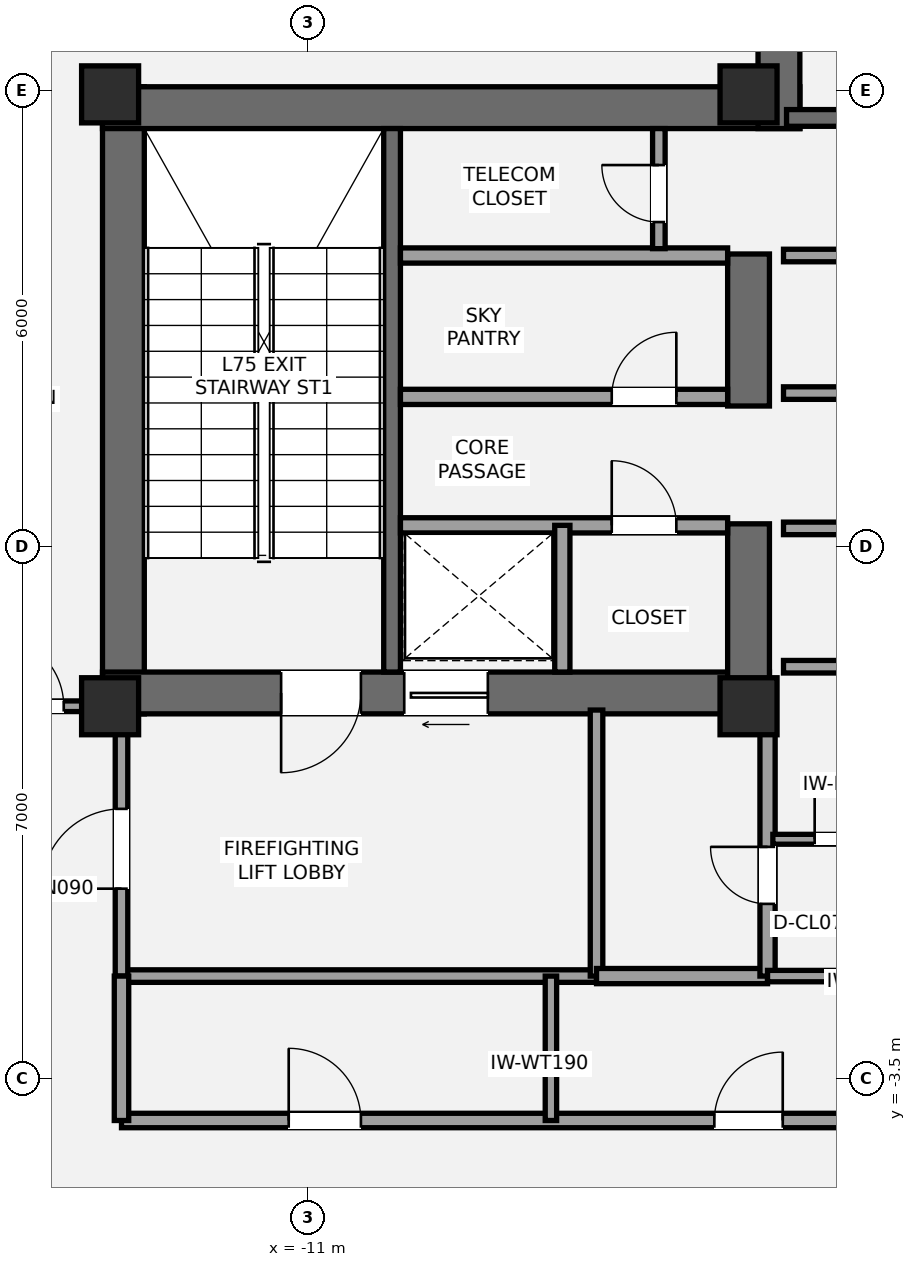
"""IFC4 building model, lengths in metres.
Left out: names, types, materials, properties, quantities, classifications, styles, units other than length and angle.
Written with IfcOpenShell. Run it as: python <this file> out.ifc"""

import sys

from ifc_helpers import new_model, si_unit, direction, frame, frame_2d, origin, origin_2d, place, context, subcontext, project, spatial, rectangle, extrude, element, fill, save


model = new_model("IFC4")
c1 = context("Model", 3, precision=1e-05, world=origin(), true_north=direction((0.0, 1.0)))
c2 = subcontext(c1, "Body", "Model", "MODEL_VIEW")
j1 = project(units=[si_unit("LENGTHUNIT", "METRE"), si_unit("PLANEANGLEUNIT", "RADIAN")], contexts=[c1])
p1 = place(None, origin())
s1 = spatial("IfcSite", under=j1, at=p1, CompositionType="ELEMENT")
p2 = place(p1, origin())
s2 = spatial("IfcBuilding", under=s1, at=p2, CompositionType="ELEMENT")
p3 = place(p2, frame((0.0, 0.0, 264.8)))
s3 = spatial("IfcBuildingStorey", under=s2, at=p3, CompositionType="ELEMENT", Elevation=264.8)
p4 = place(p3, frame((-13.425, 1.3, 0.0), z_axis=(0.0, 0.0, 1.0), x_axis=(0.0, 1.0, 0.0)))
e1 = element("IfcWall", 1, at=p4, inside=s3, PredefinedType="SHEAR", context=c2, shape_type="SweptSolid", body=[
    extrude(rectangle(XDim=8.25, YDim=0.55, at=frame_2d((4.125, 0.0))), origin(), (0.0, 0.0, 1.0), 4.4),
])
p5 = place(p3, frame((-13.7, 9.275, 0.0), z_axis=(0.0, 0.0, 1.0), x_axis=(1.0, 0.0, 0.0)))
e2 = element("IfcWall", 2, at=p5, inside=s3, PredefinedType="SHEAR", context=c2, shape_type="SweptSolid", body=[
    extrude(rectangle(XDim=9.175, YDim=0.55, at=frame_2d((4.587, 0.0))), origin(), (0.0, 0.0, 1.0), 4.4),
])
p6 = place(p3, frame((-4.925, 1.575, 0.0), z_axis=(0.0, 0.0, 1.0), x_axis=(-1.0, 0.0, 0.0)))
e3 = element("IfcWall", 3, at=p6, inside=s3, PredefinedType="SHEAR", context=c2, shape_type="SweptSolid", body=[
    extrude(rectangle(XDim=8.775, YDim=0.55, at=frame_2d((4.387, 0.0))), origin(), (0.0, 0.0, 1.0), 4.4),
])
p7 = place(p6, frame((5.375, 0.0, 0.0)))
e4 = element("IfcOpeningElement", 4, at=p7, cuts=e3, PredefinedType="OPENING", context=c2, shape_type="SweptSolid", body=[
    extrude(rectangle(XDim=1.05, YDim=2.15, at=frame_2d((0.525, 1.075))), frame((0.0, 0.285, 0.0), z_axis=(0.0, -1.0, 0.0), x_axis=(1.0, 0.0, 0.0)), (0.0, 0.0, 1.0), 0.57),
])
p8 = place(p6, frame((3.705, 0.0, 0.0)))
e5 = element("IfcOpeningElement", 5, at=p8, cuts=e3, PredefinedType="OPENING", context=c2, shape_type="SweptSolid", body=[
    extrude(rectangle(XDim=1.1, YDim=2.2, at=frame_2d((0.55, 1.1))), frame((0.0, 0.285, 0.0), z_axis=(0.0, -1.0, 0.0), x_axis=(1.0, 0.0, 0.0)), (0.0, 0.0, 1.0), 0.57),
])
p9 = place(p3, frame((-5.2, 1.3, 0.0), z_axis=(0.0, 0.0, 1.0), x_axis=(0.0, 1.0, 0.0)))
e6 = element("IfcWall", 6, at=p9, inside=s3, PredefinedType="SHEAR", context=c2, shape_type="SweptSolid", body=[
    extrude(rectangle(XDim=2.5, YDim=0.55, at=frame_2d((1.25, 0.0))), origin(), (0.0, 0.0, 1.0), 4.4),
])
p10 = place(p3, frame((-5.2, 5.35, 0.0), z_axis=(0.0, 0.0, 1.0), x_axis=(0.0, 1.0, 0.0)))
e7 = element("IfcWall", 7, at=p10, inside=s3, PredefinedType="SHEAR", context=c2, shape_type="SweptSolid", body=[
    extrude(rectangle(XDim=2.0, YDim=0.55, at=frame_2d((1.0, 0.0))), origin(), (0.0, 0.0, 1.0), 4.4),
])
p11 = place(p3, frame((-9.89, 1.85, 0.0), z_axis=(0.0, 0.0, 1.0), x_axis=(0.0, 1.0, 0.0)))
e8 = element("IfcWall", 8, at=p11, inside=s3, PredefinedType="SHEAR", context=c2, shape_type="SweptSolid", body=[
    extrude(rectangle(XDim=7.15, YDim=0.22, at=frame_2d((3.575, 0.0))), origin(), (0.0, 0.0, 1.0), 4.4),
])
p12 = place(p3, frame((-4.8, 9.0, 0.0), z_axis=(0.0, 0.0, 1.0), x_axis=(0.0, 1.0, 0.0)))
e9 = element("IfcWall", 9, at=p12, inside=s3, PredefinedType="SHEAR", context=c2, shape_type="SweptSolid", body=[
    extrude(rectangle(XDim=3.95, YDim=0.55, at=frame_2d((1.975, 0.0))), origin(), (0.0, 0.0, 1.0), 4.4),
])
p13 = place(p3, frame((-4.7, 9.14, 0.0), z_axis=(0.0, 0.0, 1.0), x_axis=(1.0, 0.0, 0.0)))
e10 = element("IfcWall", 10, at=p13, inside=s3, PredefinedType="SHEAR", context=c2, shape_type="SweptSolid", body=[
    extrude(rectangle(XDim=9.3, YDim=0.22, at=frame_2d((4.65, 0.0))), origin(), (0.0, 0.0, 1.0), 4.4),
])
p14 = place(p13, frame((1.15, 0.0, 0.0)))
e11 = element("IfcOpeningElement", 11, at=p14, cuts=e10, PredefinedType="OPENING", context=c2, shape_type="SweptSolid", body=[
    extrude(rectangle(XDim=1.05, YDim=2.15, at=frame_2d((0.525, 1.075))), frame((0.0, 0.12, 0.0), z_axis=(0.0, -1.0, 0.0), x_axis=(1.0, 0.0, 0.0)), (0.0, 0.0, 1.0), 0.24),
])
for number, where, z_axis, x_axis in (
    (12, (-13.6, 1.4, 0.0), (0.0, 0.0, 1.0), (1.0, 0.0, 0.0)),
    (13, (-13.6, 9.45, 0.0), (0.0, 0.0, 1.0), (1.0, 0.0, 0.0)),
    (14, (-5.2, 1.4, 0.0), (0.0, 0.0, 1.0), (1.0, 0.0, 0.0)),
    (15, (-5.2, 9.45, 0.0), (0.0, 0.0, 1.0), (1.0, 0.0, 0.0)),
):
    element("IfcColumn", number, at=place(p3, frame(where, z_axis=z_axis, x_axis=x_axis)), inside=s3, PredefinedType="PILASTER", context=c2, shape_type="SweptSolid", body=[
        extrude(rectangle(XDim=0.75, YDim=0.75, at=origin_2d()), origin(), (0.0, 0.0, 1.0), 4.4),
    ])
p15 = place(p3, frame((-17.315, 9.52, 0.0), z_axis=(0.0, 0.0, 1.0), x_axis=(0.827740547026, 0.56111102895, 0.0)))
e16 = element("IfcWall", 16, at=p15, inside=s3, PredefinedType="STANDARD", context=c2, shape_type="SweptSolid", body=[
    extrude(rectangle(XDim=3.778, YDim=0.44, at=frame_2d((1.889, 0.0))), origin(), (0.0, 0.0, 1.0), 3.566),
])
p16 = place(p15, frame((0.446, 0.0, 0.6)))
e17 = element("IfcOpeningElement", 17, at=p16, cuts=e16, PredefinedType="OPENING", context=c2, shape_type="SweptSolid", body=[
    extrude(rectangle(XDim=2.0, YDim=2.1, at=frame_2d((1.0, 1.05))), frame((0.0, 0.23, 0.0), z_axis=(0.0, -1.0, 0.0), x_axis=(1.0, 0.0, 0.0)), (0.0, 0.0, 1.0), 0.46),
])
p17 = place(p3, frame((-13.45, -2.15, 0.0), z_axis=(0.0, 0.0, 1.0), x_axis=(1.0, 0.0, 0.0)))
e18 = element("IfcWall", 18, at=p17, inside=s3, PredefinedType="PARTITIONING", context=c2, shape_type="SweptSolid", body=[
    extrude(rectangle(XDim=6.25, YDim=0.165, at=frame_2d((3.125, 0.0))), origin(), (0.0, 0.0, 1.0), 4.2),
])
p18 = place(p3, frame((-13.45, -2.15, 0.0), z_axis=(0.0, 0.0, 1.0), x_axis=(0.0, 1.0, 0.0)))
e19 = element("IfcWall", 19, at=p18, inside=s3, PredefinedType="PARTITIONING", context=c2, shape_type="SweptSolid", body=[
    extrude(rectangle(XDim=3.5, YDim=0.165, at=frame_2d((1.75, 0.0))), origin(), (0.0, 0.0, 1.0), 4.2),
])
p19 = place(p18, frame((1.15, 0.0, 0.0)))
e20 = element("IfcOpeningElement", 20, at=p19, cuts=e19, PredefinedType="OPENING", context=c2, shape_type="SweptSolid", body=[
    extrude(rectangle(XDim=1.05, YDim=2.15, at=frame_2d((0.525, 1.075))), frame((0.0, 0.093, 0.0), z_axis=(0.0, -1.0, 0.0), x_axis=(1.0, 0.0, 0.0)), (0.0, 0.0, 1.0), 0.185),
])
p20 = place(p3, frame((-7.2, -2.15, 0.0), z_axis=(0.0, 0.0, 1.0), x_axis=(0.0, 1.0, 0.0)))
e21 = element("IfcWall", 21, at=p20, inside=s3, PredefinedType="PARTITIONING", context=c2, shape_type="SweptSolid", body=[
    extrude(rectangle(XDim=3.5, YDim=0.165, at=frame_2d((1.75, 0.0))), origin(), (0.0, 0.0, 1.0), 4.2),
])
p21 = place(p3, frame((-7.2, -2.15, 0.0), z_axis=(0.0, 0.0, 1.0), x_axis=(1.0, 0.0, 0.0)))
e22 = element("IfcWall", 22, at=p21, inside=s3, PredefinedType="SOLIDWALL", context=c2, shape_type="SweptSolid", body=[
    extrude(rectangle(XDim=2.25, YDim=0.2, at=frame_2d((1.125, 0.0))), origin(), (0.0, 0.0, 1.0), 4.2),
])
p22 = place(p3, frame((-4.95, -2.15, 0.0), z_axis=(0.0, 0.0, 1.0), x_axis=(0.0, 1.0, 0.0)))
e23 = element("IfcWall", 23, at=p22, inside=s3, PredefinedType="SOLIDWALL", context=c2, shape_type="SweptSolid", body=[
    extrude(rectangle(XDim=3.5, YDim=0.2, at=frame_2d((1.75, 0.0))), origin(), (0.0, 0.0, 1.0), 3.568),
])
p23 = place(p22, frame((0.95, 0.0, 0.0)))
e24 = element("IfcOpeningElement", 24, at=p23, cuts=e23, PredefinedType="OPENING", context=c2, shape_type="SweptSolid", body=[
    extrude(rectangle(XDim=0.75, YDim=2.1, at=frame_2d((0.375, 1.05))), frame((0.0, 0.11, 0.0), z_axis=(0.0, -1.0, 0.0), x_axis=(1.0, 0.0, 0.0)), (0.0, 0.0, 1.0), 0.22),
])
p24 = place(p3, frame((-4.88, -0.35, 0.0), z_axis=(0.0, 0.0, 1.0), x_axis=(1.0, 0.0, 0.0)))
e25 = element("IfcWall", 25, at=p24, inside=s3, PredefinedType="PARTITIONING", context=c2, shape_type="SweptSolid", body=[
    extrude(rectangle(XDim=1.99, YDim=0.13, at=frame_2d((0.995, 0.0))), origin(), (0.0, 0.0, 1.0), 4.2),
])
p25 = place(p24, frame((0.55, 0.0, 0.0)))
e26 = element("IfcOpeningElement", 26, at=p25, cuts=e25, PredefinedType="OPENING", context=c2, shape_type="SweptSolid", body=[
    extrude(rectangle(XDim=0.78, YDim=2.1, at=frame_2d((0.39, 1.05))), frame((0.0, 0.075, 0.0), z_axis=(0.0, -1.0, 0.0), x_axis=(1.0, 0.0, 0.0)), (0.0, 0.0, 1.0), 0.15),
])
p26 = place(p3, frame((-9.78, 3.78, 0.0), z_axis=(0.0, 0.0, 1.0), x_axis=(1.0, 0.0, 0.0)))
e27 = element("IfcWall", 27, at=p26, inside=s3, PredefinedType="SOLIDWALL", context=c2, shape_type="SweptSolid", body=[
    extrude(rectangle(XDim=4.305, YDim=0.2, at=frame_2d((2.152, 0.0))), origin(), (0.0, 0.0, 1.0), 4.2),
])
p27 = place(p26, frame((2.78, 0.0, 0.0)))
e28 = element("IfcOpeningElement", 28, at=p27, cuts=e27, PredefinedType="OPENING", context=c2, shape_type="SweptSolid", body=[
    extrude(rectangle(XDim=0.85, YDim=2.1, at=frame_2d((0.425, 1.05))), frame((0.0, 0.11, 0.0), z_axis=(0.0, -1.0, 0.0), x_axis=(1.0, 0.0, 0.0)), (0.0, 0.0, 1.0), 0.22),
])
p28 = place(p3, frame((-7.65, 1.85, 0.0), z_axis=(0.0, 0.0, 1.0), x_axis=(0.0, 1.0, 0.0)))
e29 = element("IfcWall", 29, at=p28, inside=s3, PredefinedType="SOLIDWALL", context=c2, shape_type="SweptSolid", body=[
    extrude(rectangle(XDim=1.93, YDim=0.2, at=frame_2d((0.965, 0.0))), origin(), (0.0, 0.0, 1.0), 4.2),
])
p29 = place(p3, frame((-9.78, 5.47, 0.0), z_axis=(0.0, 0.0, 1.0), x_axis=(1.0, 0.0, 0.0)))
e30 = element("IfcWall", 30, at=p29, inside=s3, PredefinedType="SOLIDWALL", context=c2, shape_type="SweptSolid", body=[
    extrude(rectangle(XDim=4.305, YDim=0.2, at=frame_2d((2.152, 0.0))), origin(), (0.0, 0.0, 1.0), 4.2),
])
p30 = place(p29, frame((2.78, 0.0, 0.0)))
e31 = element("IfcOpeningElement", 31, at=p30, cuts=e30, PredefinedType="OPENING", context=c2, shape_type="SweptSolid", body=[
    extrude(rectangle(XDim=0.85, YDim=2.1, at=frame_2d((0.425, 1.05))), frame((0.0, 0.11, 0.0), z_axis=(0.0, -1.0, 0.0), x_axis=(1.0, 0.0, 0.0)), (0.0, 0.0, 1.0), 0.22),
])
p31 = place(p3, frame((-9.78, 7.33, 0.0), z_axis=(0.0, 0.0, 1.0), x_axis=(1.0, 0.0, 0.0)))
e32 = element("IfcWall", 32, at=p31, inside=s3, PredefinedType="SOLIDWALL", context=c2, shape_type="SweptSolid", body=[
    extrude(rectangle(XDim=4.305, YDim=0.2, at=frame_2d((2.152, 0.0))), origin(), (0.0, 0.0, 1.0), 4.2),
])
p32 = place(p3, frame((-4.74, 1.92, 0.0), z_axis=(0.0, 0.0, 1.0), x_axis=(1.0, 0.0, 0.0)))
e33 = element("IfcWall", 33, at=p32, inside=s3, PredefinedType="PARTITIONING", context=c2, shape_type="SweptSolid", body=[
    extrude(rectangle(XDim=3.89, YDim=0.165, at=frame_2d((1.945, 0.0))), origin(), (0.0, 0.0, 1.0), 3.34),
])
p33 = place(p3, frame((-4.74, 3.74, 0.0), z_axis=(0.0, 0.0, 1.0), x_axis=(1.0, 0.0, 0.0)))
e34 = element("IfcWall", 34, at=p33, inside=s3, PredefinedType="PARTITIONING", context=c2, shape_type="SweptSolid", body=[
    extrude(rectangle(XDim=3.89, YDim=0.165, at=frame_2d((1.945, 0.0))), origin(), (0.0, 0.0, 1.0), 4.2),
])
p34 = place(p33, frame((1.6, 0.0, 0.0)))
e35 = element("IfcOpeningElement", 35, at=p34, cuts=e34, PredefinedType="OPENING", context=c2, shape_type="SweptSolid", body=[
    extrude(rectangle(XDim=0.85, YDim=2.1, at=frame_2d((0.425, 1.05))), frame((0.0, 0.093, 0.0), z_axis=(0.0, -1.0, 0.0), x_axis=(1.0, 0.0, 0.0)), (0.0, 0.0, 1.0), 0.185),
])
p35 = place(p3, frame((-4.74, 5.52, 0.0), z_axis=(0.0, 0.0, 1.0), x_axis=(1.0, 0.0, 0.0)))
e36 = element("IfcWall", 36, at=p35, inside=s3, PredefinedType="PARTITIONING", context=c2, shape_type="SweptSolid", body=[
    extrude(rectangle(XDim=3.89, YDim=0.165, at=frame_2d((1.945, 0.0))), origin(), (0.0, 0.0, 1.0), 4.2),
])
p36 = place(p35, frame((1.6, 0.0, 0.0)))
e37 = element("IfcOpeningElement", 37, at=p36, cuts=e36, PredefinedType="OPENING", context=c2, shape_type="SweptSolid", body=[
    extrude(rectangle(XDim=0.85, YDim=2.1, at=frame_2d((0.425, 1.05))), frame((0.0, 0.093, 0.0), z_axis=(0.0, -1.0, 0.0), x_axis=(1.0, 0.0, 0.0)), (0.0, 0.0, 1.0), 0.185),
])
p37 = place(p3, frame((-4.74, 7.33, 0.0), z_axis=(0.0, 0.0, 1.0), x_axis=(1.0, 0.0, 0.0)))
e38 = element("IfcWall", 38, at=p37, inside=s3, PredefinedType="PARTITIONING", context=c2, shape_type="SweptSolid", body=[
    extrude(rectangle(XDim=3.89, YDim=0.165, at=frame_2d((1.945, 0.0))), origin(), (0.0, 0.0, 1.0), 4.2),
])
p38 = place(p3, frame((-6.38, 7.42, 0.0), z_axis=(0.0, 0.0, 1.0), x_axis=(0.0, 1.0, 0.0)))
e39 = element("IfcWall", 39, at=p38, inside=s3, PredefinedType="PARTITIONING", context=c2, shape_type="SweptSolid", body=[
    extrude(rectangle(XDim=1.58, YDim=0.165, at=frame_2d((0.79, 0.0))), origin(), (0.0, 0.0, 1.0), 4.2),
])
p39 = place(p38, frame((0.35, 0.0, 0.0)))
e40 = element("IfcOpeningElement", 40, at=p39, cuts=e39, PredefinedType="OPENING", context=c2, shape_type="SweptSolid", body=[
    extrude(rectangle(XDim=0.75, YDim=2.1, at=frame_2d((0.375, 1.05))), frame((0.0, 0.093, 0.0), z_axis=(0.0, -1.0, 0.0), x_axis=(1.0, 0.0, 0.0)), (0.0, 0.0, 1.0), 0.185),
])
p40 = place(p3, frame((-13.45, -4.05, 0.0), z_axis=(0.0, 0.0, 1.0), x_axis=(1.0, 0.0, 0.0)))
e41 = element("IfcWall", 41, at=p40, inside=s3, PredefinedType="PLUMBINGWALL", context=c2, shape_type="SweptSolid", body=[
    extrude(rectangle(XDim=11.35, YDim=0.19, at=frame_2d((5.675, 0.0))), origin(), (0.0, 0.0, 1.0), 3.587),
])
p41 = place(p40, frame((2.2, 0.0, 0.0)))
e42 = element("IfcOpeningElement", 42, at=p41, cuts=e41, PredefinedType="OPENING", context=c2, shape_type="SweptSolid", body=[
    extrude(rectangle(XDim=0.95, YDim=2.15, at=frame_2d((0.475, 1.075))), frame((0.0, 0.105, 0.0), z_axis=(0.0, -1.0, 0.0), x_axis=(1.0, 0.0, 0.0)), (0.0, 0.0, 1.0), 0.21),
])
p42 = place(p40, frame((7.8, 0.0, 0.0)))
e43 = element("IfcOpeningElement", 43, at=p42, cuts=e41, PredefinedType="OPENING", context=c2, shape_type="SweptSolid", body=[
    extrude(rectangle(XDim=0.9, YDim=2.1, at=frame_2d((0.45, 1.05))), frame((0.0, 0.105, 0.0), z_axis=(0.0, -1.0, 0.0), x_axis=(1.0, 0.0, 0.0)), (0.0, 0.0, 1.0), 0.21),
])
p43 = place(p3, frame((-4.95, -2.15, 0.0), z_axis=(0.0, 0.0, 1.0), x_axis=(1.0, 0.0, 0.0)))
e44 = element("IfcWall", 44, at=p43, inside=s3, PredefinedType="PLUMBINGWALL", context=c2, shape_type="SweptSolid", body=[
    extrude(rectangle(XDim=2.85, YDim=0.15, at=frame_2d((1.425, 0.0))), origin(), (0.0, 0.0, 1.0), 4.2),
])
p44 = place(p3, frame((-13.45, -4.05, 0.0), z_axis=(0.0, 0.0, 1.0), x_axis=(0.0, 1.0, 0.0)))
e45 = element("IfcWall", 45, at=p44, inside=s3, PredefinedType="PLUMBINGWALL", context=c2, shape_type="SweptSolid", body=[
    extrude(rectangle(XDim=1.9, YDim=0.19, at=frame_2d((0.95, 0.0))), origin(), (0.0, 0.0, 1.0), 4.2),
])
p45 = place(p3, frame((-7.8, -4.05, 0.0), z_axis=(0.0, 0.0, 1.0), x_axis=(0.0, 1.0, 0.0)))
e46 = element("IfcWall", 46, at=p45, inside=s3, PredefinedType="PLUMBINGWALL", context=c2, shape_type="SweptSolid", body=[
    extrude(rectangle(XDim=1.9, YDim=0.15, at=frame_2d((0.95, 0.0))), origin(), (0.0, 0.0, 1.0), 4.2),
])
p46 = place(p3, frame((-15.45, 1.4, 0.0), z_axis=(0.0, 0.0, 1.0), x_axis=(1.0, 0.0, 0.0)))
e47 = element("IfcWall", 47, at=p46, inside=s3, PredefinedType="PARTITIONING", context=c2, shape_type="SweptSolid", body=[
    extrude(rectangle(XDim=1.75, YDim=0.14, at=frame_2d((0.875, 0.0))), origin(), (0.0, 0.0, 1.0), 3.661),
])
p47 = place(p46, frame((0.32, 0.0, 0.0)))
e48 = element("IfcOpeningElement", 48, at=p47, cuts=e47, PredefinedType="OPENING", context=c2, shape_type="SweptSolid", body=[
    extrude(rectangle(XDim=0.92, YDim=2.15, at=frame_2d((0.46, 1.075))), frame((0.0, 0.08, 0.0), z_axis=(0.0, -1.0, 0.0), x_axis=(1.0, 0.0, 0.0)), (0.0, 0.0, 1.0), 0.16),
])
p48 = place(p7, origin())
e49 = element("IfcDoor", 49, at=p48, inside=s3, OperationType="SINGLE_SWING_RIGHT", PredefinedType="DOOR", context=c2, shape_type="SweptSolid", body=[
    extrude(rectangle(XDim=1.05, YDim=2.15, at=frame_2d((0.525, 1.075))), frame((0.0, 0.025, 0.0), z_axis=(0.0, -1.0, 0.0), x_axis=(1.0, 0.0, 0.0)), (0.0, 0.0, 1.0), 0.05),
])
fill(e4, e49)
p49 = place(p19, origin())
e50 = element("IfcDoor", 50, at=p49, inside=s3, OperationType="SINGLE_SWING_LEFT", PredefinedType="DOOR", context=c2, shape_type="SweptSolid", body=[
    extrude(rectangle(XDim=1.05, YDim=2.15, at=frame_2d((0.525, 1.075))), frame((0.0, 0.025, 0.0), z_axis=(0.0, -1.0, 0.0), x_axis=(1.0, 0.0, 0.0)), (0.0, 0.0, 1.0), 0.05),
])
fill(e20, e50)
p50 = place(p23, origin())
e51 = element("IfcDoor", 51, at=p50, inside=s3, OperationType="SINGLE_SWING_RIGHT", PredefinedType="DOOR", context=c2, shape_type="SweptSolid", body=[
    extrude(rectangle(XDim=0.75, YDim=2.1, at=frame_2d((0.375, 1.05))), frame((0.0, 0.025, 0.0), z_axis=(0.0, -1.0, 0.0), x_axis=(1.0, 0.0, 0.0)), (0.0, 0.0, 1.0), 0.05),
])
fill(e24, e51)
p51 = place(p25, origin())
e52 = element("IfcDoor", 52, at=p51, inside=s3, OperationType="SINGLE_SWING_LEFT", PredefinedType="DOOR", context=c2, shape_type="SweptSolid", body=[
    extrude(rectangle(XDim=0.78, YDim=2.1, at=frame_2d((0.39, 1.05))), frame((0.0, 0.025, 0.0), z_axis=(0.0, -1.0, 0.0), x_axis=(1.0, 0.0, 0.0)), (0.0, 0.0, 1.0), 0.05),
])
fill(e26, e52)
p52 = place(p8, origin())
e53 = element("IfcDoor", 53, at=p52, inside=s3, OperationType="SLIDING_TO_LEFT", PredefinedType="DOOR", context=c2, shape_type="SweptSolid", body=[
    extrude(rectangle(XDim=1.1, YDim=2.2, at=frame_2d((0.55, 1.1))), frame((0.0, 0.025, 0.0), z_axis=(0.0, -1.0, 0.0), x_axis=(1.0, 0.0, 0.0)), (0.0, 0.0, 1.0), 0.05),
])
fill(e5, e53)
p53 = place(p30, origin())
e54 = element("IfcDoor", 54, at=p53, inside=s3, OperationType="SINGLE_SWING_RIGHT", PredefinedType="DOOR", context=c2, shape_type="SweptSolid", body=[
    extrude(rectangle(XDim=0.85, YDim=2.1, at=frame_2d((0.425, 1.05))), frame((0.0, 0.025, 0.0), z_axis=(0.0, -1.0, 0.0), x_axis=(1.0, 0.0, 0.0)), (0.0, 0.0, 1.0), 0.05),
])
fill(e31, e54)
p54 = place(p27, origin())
e55 = element("IfcDoor", 55, at=p54, inside=s3, OperationType="SINGLE_SWING_LEFT", PredefinedType="DOOR", context=c2, shape_type="SweptSolid", body=[
    extrude(rectangle(XDim=0.85, YDim=2.1, at=frame_2d((0.425, 1.05))), frame((0.0, 0.025, 0.0), z_axis=(0.0, -1.0, 0.0), x_axis=(1.0, 0.0, 0.0)), (0.0, 0.0, 1.0), 0.05),
])
fill(e28, e55)
p55 = place(p39, origin())
e56 = element("IfcDoor", 56, at=p55, inside=s3, OperationType="SINGLE_SWING_RIGHT", PredefinedType="DOOR", context=c2, shape_type="SweptSolid", body=[
    extrude(rectangle(XDim=0.75, YDim=2.1, at=frame_2d((0.375, 1.05))), frame((0.0, 0.025, 0.0), z_axis=(0.0, -1.0, 0.0), x_axis=(1.0, 0.0, 0.0)), (0.0, 0.0, 1.0), 0.05),
])
fill(e40, e56)
p56 = place(p41, origin())
e57 = element("IfcDoor", 57, at=p56, inside=s3, OperationType="SINGLE_SWING_LEFT", PredefinedType="DOOR", context=c2, shape_type="SweptSolid", body=[
    extrude(rectangle(XDim=0.95, YDim=2.15, at=frame_2d((0.475, 1.075))), frame((0.0, 0.025, 0.0), z_axis=(0.0, -1.0, 0.0), x_axis=(1.0, 0.0, 0.0)), (0.0, 0.0, 1.0), 0.05),
])
fill(e42, e57)
p57 = place(p42, origin())
e58 = element("IfcDoor", 58, at=p57, inside=s3, OperationType="SINGLE_SWING_RIGHT", PredefinedType="DOOR", context=c2, shape_type="SweptSolid", body=[
    extrude(rectangle(XDim=0.9, YDim=2.1, at=frame_2d((0.45, 1.05))), frame((0.0, 0.025, 0.0), z_axis=(0.0, -1.0, 0.0), x_axis=(1.0, 0.0, 0.0)), (0.0, 0.0, 1.0), 0.05),
])
fill(e43, e58)
p58 = place(p47, origin())
e59 = element("IfcDoor", 59, at=p58, inside=s3, OperationType="SINGLE_SWING_LEFT", PredefinedType="DOOR", context=c2, shape_type="SweptSolid", body=[
    extrude(rectangle(XDim=0.92, YDim=2.15, at=frame_2d((0.46, 1.075))), frame((0.0, 0.025, 0.0), z_axis=(0.0, -1.0, 0.0), x_axis=(1.0, 0.0, 0.0)), (0.0, 0.0, 1.0), 0.05),
])
fill(e48, e59)
save(model, sys.argv[1])
